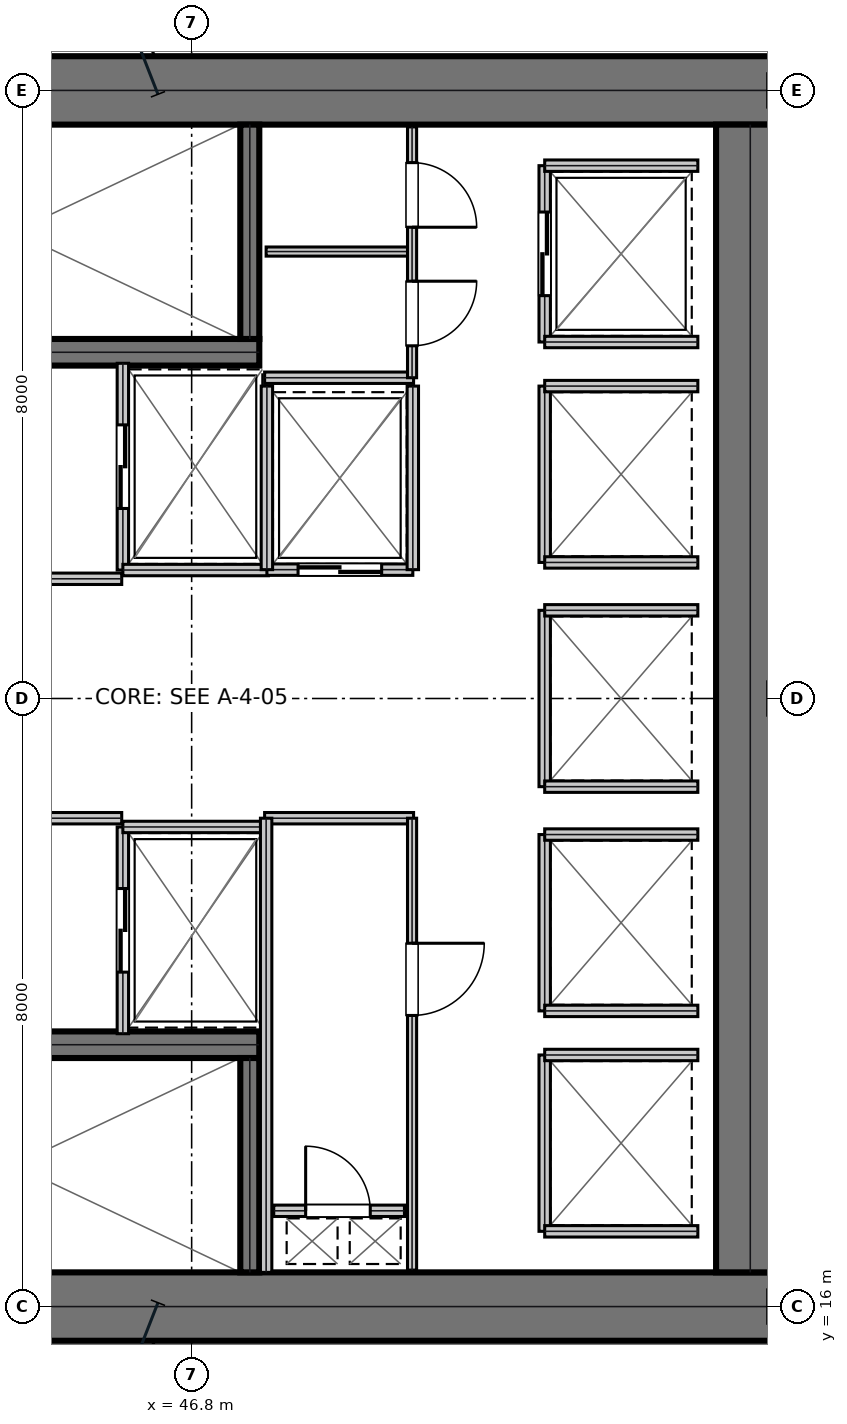
"""IFC4 building model, lengths in metres.
Left out: names, types, materials, properties, quantities, classifications, styles, units other than length and angle.
Written with IfcOpenShell. Run it as: python <this file> out.ifc"""

import sys

from ifc_helpers import new_model, si_unit, direction, frame, frame_2d, origin, place, context, subcontext, project, spatial, rectangle, extrude, element, fill, save


model = new_model("IFC4")
c1 = context("Model", 3, precision=1e-05, world=origin(), true_north=direction((0.0, 1.0)))
c2 = subcontext(c1, "Body", "Model", "MODEL_VIEW")
j1 = project(units=[si_unit("LENGTHUNIT", "METRE"), si_unit("PLANEANGLEUNIT", "RADIAN")], contexts=[c1])
p1 = place(None, origin())
s1 = spatial("IfcSite", under=j1, at=p1, CompositionType="ELEMENT")
p2 = place(p1, origin())
s2 = spatial("IfcBuilding", under=s1, at=p2, CompositionType="ELEMENT")
p3 = place(p2, frame((0.0, 0.0, 58.05)))
s3 = spatial("IfcBuildingStorey", under=s2, at=p3, CompositionType="ELEMENT", Elevation=58.05)
for number, where, z_axis, x_axis in (
    (1, (38.8, 32.0, 0.0), (0.0, 0.0, 1.0), (1.0, 0.0, 0.0)),
    (2, (38.8, 16.0, 0.0), (0.0, 0.0, 1.0), (1.0, 0.0, 0.0)),
):
    element("IfcWall", number, at=place(p3, frame(where, z_axis=z_axis, x_axis=x_axis)), inside=s3, PredefinedType="SHEAR", context=c2, shape_type="SweptSolid", body=[
        extrude(rectangle(XDim=16.0, YDim=0.9, at=frame_2d((8.0, 0.0))), origin(), (0.0, 0.0, 1.0), 3.81),
    ])
p4 = place(p3, frame((54.15, 16.45, 0.0), z_axis=(0.0, 0.0, 1.0), x_axis=(0.0, 1.0, 0.0)))
e3 = element("IfcWall", 3, at=p4, inside=s3, PredefinedType="SHEAR", context=c2, shape_type="SweptSolid", body=[
    extrude(rectangle(XDim=15.1, YDim=0.9, at=frame_2d((7.55, 0.0))), origin(), (0.0, 0.0, 1.0), 3.81),
])
p5 = place(p3, frame((39.98, 28.555, 0.0), z_axis=(0.0, 0.0, 1.0), x_axis=(1.0, 0.0, 0.0)))
e4 = element("IfcWall", 4, at=p5, inside=s3, PredefinedType="SHEAR", context=c2, shape_type="SweptSolid", body=[
    extrude(rectangle(XDim=7.71, YDim=0.35, at=frame_2d((3.855, 0.0))), origin(), (0.0, 0.0, 1.0), 3.81),
])
p6 = place(p5, frame((0.25, 0.0, 0.0)))
e5 = element("IfcOpeningElement", 5, at=p6, cuts=e4, PredefinedType="OPENING", context=c2, shape_type="SweptSolid", body=[
    extrude(rectangle(XDim=1.1, YDim=2.15, at=frame_2d((0.55, 1.075))), frame((0.0, 0.185, 0.0), z_axis=(0.0, -1.0, 0.0), x_axis=(1.0, 0.0, 0.0)), (0.0, 0.0, 1.0), 0.37),
])
p7 = place(p3, frame((39.98, 19.445, 0.0), z_axis=(0.0, 0.0, 1.0), x_axis=(1.0, 0.0, 0.0)))
e6 = element("IfcWall", 6, at=p7, inside=s3, PredefinedType="SHEAR", context=c2, shape_type="SweptSolid", body=[
    extrude(rectangle(XDim=7.71, YDim=0.35, at=frame_2d((3.855, 0.0))), origin(), (0.0, 0.0, 1.0), 3.81),
])
p8 = place(p7, frame((0.25, 0.0, 0.0)))
e7 = element("IfcOpeningElement", 7, at=p8, cuts=e6, PredefinedType="OPENING", context=c2, shape_type="SweptSolid", body=[
    extrude(rectangle(XDim=1.1, YDim=2.15, at=frame_2d((0.55, 1.075))), frame((0.0, 0.185, 0.0), z_axis=(0.0, -1.0, 0.0), x_axis=(1.0, 0.0, 0.0)), (0.0, 0.0, 1.0), 0.37),
])
for number, where, z_axis, x_axis in (
    (8, (47.565, 28.73, 0.0), (0.0, 0.0, 1.0), (0.0, 1.0, 0.0)),
    (9, (47.565, 16.45, 0.0), (0.0, 0.0, 1.0), (0.0, 1.0, 0.0)),
):
    element("IfcWall", number, at=place(p3, frame(where, z_axis=z_axis, x_axis=x_axis)), inside=s3, PredefinedType="SHEAR", context=c2, shape_type="SweptSolid", body=[
        extrude(rectangle(XDim=2.82, YDim=0.25, at=frame_2d((1.41, 0.0))), origin(), (0.0, 0.0, 1.0), 3.81),
    ])
p9 = place(p3, frame((39.98, 25.575, 0.0), z_axis=(0.0, 0.0, 1.0), x_axis=(1.0, 0.0, 0.0)))
e10 = element("IfcWall", 10, at=p9, inside=s3, PredefinedType="PARTITIONING", context=c2, shape_type="SweptSolid", body=[
    extrude(rectangle(XDim=5.9, YDim=0.15, at=frame_2d((2.95, 0.0))), origin(), (0.0, 0.0, 1.0), 3.81),
])
p10 = place(p9, frame((2.35, 0.0, 0.0)))
e11 = element("IfcOpeningElement", 11, at=p10, cuts=e10, PredefinedType="OPENING", context=c2, shape_type="SweptSolid", body=[
    extrude(rectangle(XDim=1.05, YDim=2.15, at=frame_2d((0.525, 1.075))), frame((0.0, 0.085, 0.0), z_axis=(0.0, -1.0, 0.0), x_axis=(1.0, 0.0, 0.0)), (0.0, 0.0, 1.0), 0.17),
])
p11 = place(p3, frame((39.98, 22.425, 0.0), z_axis=(0.0, 0.0, 1.0), x_axis=(1.0, 0.0, 0.0)))
e12 = element("IfcWall", 12, at=p11, inside=s3, PredefinedType="PARTITIONING", context=c2, shape_type="SweptSolid", body=[
    extrude(rectangle(XDim=5.9, YDim=0.15, at=frame_2d((2.95, 0.0))), origin(), (0.0, 0.0, 1.0), 3.81),
])
p12 = place(p11, frame((2.35, 0.0, 0.0)))
e13 = element("IfcOpeningElement", 13, at=p12, cuts=e12, PredefinedType="OPENING", context=c2, shape_type="SweptSolid", body=[
    extrude(rectangle(XDim=1.05, YDim=2.15, at=frame_2d((0.525, 1.075))), frame((0.0, 0.085, 0.0), z_axis=(0.0, -1.0, 0.0), x_axis=(1.0, 0.0, 0.0)), (0.0, 0.0, 1.0), 0.17),
])
p13 = place(p3, frame((45.895, 25.69, 0.0), z_axis=(0.0, 0.0, 1.0), x_axis=(0.0, 1.0, 0.0)))
e14 = element("IfcWall", 14, at=p13, inside=s3, PredefinedType="PARTITIONING", context=c2, shape_type="SweptSolid", body=[
    extrude(rectangle(XDim=2.72, YDim=0.15, at=frame_2d((1.36, 0.0))), origin(), (0.0, 0.0, 1.0), 3.81),
])
p14 = place(p13, frame((0.81, 0.0, 0.0)))
e15 = element("IfcOpeningElement", 15, at=p14, cuts=e14, PredefinedType="OPENING", context=c2, shape_type="SweptSolid", body=[
    extrude(rectangle(XDim=1.1, YDim=2.15, at=frame_2d((0.55, 1.075))), frame((0.0, 0.085, 0.0), z_axis=(0.0, -1.0, 0.0), x_axis=(1.0, 0.0, 0.0)), (0.0, 0.0, 1.0), 0.17),
])
p15 = place(p3, frame((45.895, 25.69, 0.0), z_axis=(0.0, 0.0, 1.0), x_axis=(1.0, 0.0, 0.0)))
e16 = element("IfcWall", 16, at=p15, inside=s3, PredefinedType="PARTITIONING", context=c2, shape_type="SweptSolid", body=[
    extrude(rectangle(XDim=1.915, YDim=0.15, at=frame_2d((0.958, 0.0))), origin(), (0.0, 0.0, 1.0), 3.81),
])
p16 = place(p3, frame((45.895, 19.59, 0.0), z_axis=(0.0, 0.0, 1.0), x_axis=(0.0, 1.0, 0.0)))
e17 = element("IfcWall", 17, at=p16, inside=s3, PredefinedType="PARTITIONING", context=c2, shape_type="SweptSolid", body=[
    extrude(rectangle(XDim=2.72, YDim=0.15, at=frame_2d((1.36, 0.0))), origin(), (0.0, 0.0, 1.0), 3.81),
])
p17 = place(p16, frame((0.81, 0.0, 0.0)))
e18 = element("IfcOpeningElement", 18, at=p17, cuts=e17, PredefinedType="OPENING", context=c2, shape_type="SweptSolid", body=[
    extrude(rectangle(XDim=1.1, YDim=2.15, at=frame_2d((0.55, 1.075))), frame((0.0, 0.085, 0.0), z_axis=(0.0, -1.0, 0.0), x_axis=(1.0, 0.0, 0.0)), (0.0, 0.0, 1.0), 0.17),
])
p18 = place(p3, frame((45.895, 22.31, 0.0), z_axis=(0.0, 0.0, 1.0), x_axis=(1.0, 0.0, 0.0)))
e19 = element("IfcWall", 19, at=p18, inside=s3, PredefinedType="PARTITIONING", context=c2, shape_type="SweptSolid", body=[
    extrude(rectangle(XDim=1.915, YDim=0.15, at=frame_2d((0.958, 0.0))), origin(), (0.0, 0.0, 1.0), 3.81),
])
p19 = place(p3, frame((47.79, 25.695, 0.0), z_axis=(0.0, 0.0, 1.0), x_axis=(1.0, 0.0, 0.0)))
e20 = element("IfcWall", 20, at=p19, inside=s3, PredefinedType="PARTITIONING", context=c2, shape_type="SweptSolid", body=[
    extrude(rectangle(XDim=1.92, YDim=0.15, at=frame_2d((0.96, 0.0))), origin(), (0.0, 0.0, 1.0), 3.81),
])
p20 = place(p19, frame((0.41, 0.0, 0.0)))
e21 = element("IfcOpeningElement", 21, at=p20, cuts=e20, PredefinedType="OPENING", context=c2, shape_type="SweptSolid", body=[
    extrude(rectangle(XDim=1.1, YDim=2.15, at=frame_2d((0.55, 1.075))), frame((0.0, 0.085, 0.0), z_axis=(0.0, -1.0, 0.0), x_axis=(1.0, 0.0, 0.0)), (0.0, 0.0, 1.0), 0.17),
])
for number, where, z_axis, x_axis in (
    (22, (47.79, 25.695, 0.0), (0.0, 0.0, 1.0), (0.0, 1.0, 0.0)),
    (23, (49.71, 25.695, 0.0), (0.0, 0.0, 1.0), (0.0, 1.0, 0.0)),
):
    element("IfcWall", number, at=place(p3, frame(where, z_axis=z_axis, x_axis=x_axis)), inside=s3, PredefinedType="PARTITIONING", context=c2, shape_type="SweptSolid", body=[
        extrude(rectangle(XDim=2.415, YDim=0.15, at=frame_2d((1.208, 0.0))), origin(), (0.0, 0.0, 1.0), 3.81),
    ])
p21 = place(p3, frame((51.445, 28.69, 0.0), z_axis=(0.0, 0.0, 1.0), x_axis=(0.0, 1.0, 0.0)))
e24 = element("IfcWall", 24, at=p21, inside=s3, PredefinedType="PARTITIONING", context=c2, shape_type="SweptSolid", body=[
    extrude(rectangle(XDim=2.32, YDim=0.15, at=frame_2d((1.16, 0.0))), origin(), (0.0, 0.0, 1.0), 3.81),
])
p22 = place(p21, frame((0.61, 0.0, 0.0)))
e25 = element("IfcOpeningElement", 25, at=p22, cuts=e24, PredefinedType="OPENING", context=c2, shape_type="SweptSolid", body=[
    extrude(rectangle(XDim=1.1, YDim=2.15, at=frame_2d((0.55, 1.075))), frame((0.0, 0.085, 0.0), z_axis=(0.0, -1.0, 0.0), x_axis=(1.0, 0.0, 0.0)), (0.0, 0.0, 1.0), 0.17),
])
for number, where, z_axis, x_axis in (
    (26, (51.445, 28.69, 0.0), (0.0, 0.0, 1.0), (1.0, 0.0, 0.0)),
    (27, (51.445, 31.01, 0.0), (0.0, 0.0, 1.0), (1.0, 0.0, 0.0)),
):
    element("IfcWall", number, at=place(p3, frame(where, z_axis=z_axis, x_axis=x_axis)), inside=s3, PredefinedType="PARTITIONING", context=c2, shape_type="SweptSolid", body=[
        extrude(rectangle(XDim=2.015, YDim=0.15, at=frame_2d((1.007, 0.0))), origin(), (0.0, 0.0, 1.0), 3.81),
    ])
p23 = place(p3, frame((51.445, 25.79, 0.0), z_axis=(0.0, 0.0, 1.0), x_axis=(0.0, 1.0, 0.0)))
e28 = element("IfcWall", 28, at=p23, inside=s3, PredefinedType="PARTITIONING", context=c2, shape_type="SweptSolid", body=[
    extrude(rectangle(XDim=2.32, YDim=0.15, at=frame_2d((1.16, 0.0))), origin(), (0.0, 0.0, 1.0), 3.81),
])
for number, where, z_axis, x_axis in (
    (29, (51.445, 25.79, 0.0), (0.0, 0.0, 1.0), (1.0, 0.0, 0.0)),
    (30, (51.445, 28.11, 0.0), (0.0, 0.0, 1.0), (1.0, 0.0, 0.0)),
):
    element("IfcWall", number, at=place(p3, frame(where, z_axis=z_axis, x_axis=x_axis)), inside=s3, PredefinedType="PARTITIONING", context=c2, shape_type="SweptSolid", body=[
        extrude(rectangle(XDim=2.015, YDim=0.15, at=frame_2d((1.007, 0.0))), origin(), (0.0, 0.0, 1.0), 3.81),
    ])
p24 = place(p3, frame((51.445, 19.89, 0.0), z_axis=(0.0, 0.0, 1.0), x_axis=(0.0, 1.0, 0.0)))
e31 = element("IfcWall", 31, at=p24, inside=s3, PredefinedType="PARTITIONING", context=c2, shape_type="SweptSolid", body=[
    extrude(rectangle(XDim=2.32, YDim=0.15, at=frame_2d((1.16, 0.0))), origin(), (0.0, 0.0, 1.0), 3.81),
])
for number, where, z_axis, x_axis in (
    (32, (51.445, 19.89, 0.0), (0.0, 0.0, 1.0), (1.0, 0.0, 0.0)),
    (33, (51.445, 22.21, 0.0), (0.0, 0.0, 1.0), (1.0, 0.0, 0.0)),
):
    element("IfcWall", number, at=place(p3, frame(where, z_axis=z_axis, x_axis=x_axis)), inside=s3, PredefinedType="PARTITIONING", context=c2, shape_type="SweptSolid", body=[
        extrude(rectangle(XDim=2.015, YDim=0.15, at=frame_2d((1.007, 0.0))), origin(), (0.0, 0.0, 1.0), 3.81),
    ])
p25 = place(p3, frame((51.445, 22.84, 0.0), z_axis=(0.0, 0.0, 1.0), x_axis=(0.0, 1.0, 0.0)))
e34 = element("IfcWall", 34, at=p25, inside=s3, PredefinedType="PARTITIONING", context=c2, shape_type="SweptSolid", body=[
    extrude(rectangle(XDim=2.32, YDim=0.15, at=frame_2d((1.16, 0.0))), origin(), (0.0, 0.0, 1.0), 3.81),
])
for number, where, z_axis, x_axis in (
    (35, (51.445, 22.84, 0.0), (0.0, 0.0, 1.0), (1.0, 0.0, 0.0)),
    (36, (51.445, 25.16, 0.0), (0.0, 0.0, 1.0), (1.0, 0.0, 0.0)),
):
    element("IfcWall", number, at=place(p3, frame(where, z_axis=z_axis, x_axis=x_axis)), inside=s3, PredefinedType="PARTITIONING", context=c2, shape_type="SweptSolid", body=[
        extrude(rectangle(XDim=2.015, YDim=0.15, at=frame_2d((1.007, 0.0))), origin(), (0.0, 0.0, 1.0), 3.81),
    ])
p26 = place(p3, frame((51.445, 16.99, 0.0), z_axis=(0.0, 0.0, 1.0), x_axis=(0.0, 1.0, 0.0)))
e37 = element("IfcWall", 37, at=p26, inside=s3, PredefinedType="PARTITIONING", context=c2, shape_type="SweptSolid", body=[
    extrude(rectangle(XDim=2.32, YDim=0.15, at=frame_2d((1.16, 0.0))), origin(), (0.0, 0.0, 1.0), 3.81),
])
for number, where, z_axis, x_axis in (
    (38, (51.445, 16.99, 0.0), (0.0, 0.0, 1.0), (1.0, 0.0, 0.0)),
    (39, (51.445, 19.31, 0.0), (0.0, 0.0, 1.0), (1.0, 0.0, 0.0)),
):
    element("IfcWall", number, at=place(p3, frame(where, z_axis=z_axis, x_axis=x_axis)), inside=s3, PredefinedType="PARTITIONING", context=c2, shape_type="SweptSolid", body=[
        extrude(rectangle(XDim=2.015, YDim=0.15, at=frame_2d((1.007, 0.0))), origin(), (0.0, 0.0, 1.0), 3.81),
    ])
p27 = place(p3, frame((47.88, 17.26, 0.0), z_axis=(0.0, 0.0, 1.0), x_axis=(1.0, 0.0, 0.0)))
e40 = element("IfcWall", 40, at=p27, inside=s3, PredefinedType="PARTITIONING", context=c2, shape_type="SweptSolid", body=[
    extrude(rectangle(XDim=1.72, YDim=0.15, at=frame_2d((0.86, 0.0))), origin(), (0.0, 0.0, 1.0), 3.81),
])
p28 = place(p27, frame((0.42, 0.0, 0.0)))
e41 = element("IfcOpeningElement", 41, at=p28, cuts=e40, PredefinedType="OPENING", context=c2, shape_type="SweptSolid", body=[
    extrude(rectangle(XDim=0.85, YDim=2.15, at=frame_2d((0.425, 1.075))), frame((0.0, 0.085, 0.0), z_axis=(0.0, -1.0, 0.0), x_axis=(1.0, 0.0, 0.0)), (0.0, 0.0, 1.0), 0.17),
])
p29 = place(p3, frame((47.76, 22.425, 0.0), z_axis=(0.0, 0.0, 1.0), x_axis=(1.0, 0.0, 0.0)))
e42 = element("IfcWall", 42, at=p29, inside=s3, PredefinedType="PARTITIONING", context=c2, shape_type="SweptSolid", body=[
    extrude(rectangle(XDim=1.96, YDim=0.15, at=frame_2d((0.98, 0.0))), origin(), (0.0, 0.0, 1.0), 3.81),
])
p30 = place(p3, frame((47.78, 16.45, 0.0), z_axis=(0.0, 0.0, 1.0), x_axis=(0.0, 1.0, 0.0)))
e43 = element("IfcWall", 43, at=p30, inside=s3, PredefinedType="PARTITIONING", context=c2, shape_type="SweptSolid", body=[
    extrude(rectangle(XDim=5.975, YDim=0.15, at=frame_2d((2.988, 0.0))), origin(), (0.0, 0.0, 1.0), 3.81),
])
p31 = place(p3, frame((49.7, 16.48, 0.0), z_axis=(0.0, 0.0, 1.0), x_axis=(0.0, 1.0, 0.0)))
e44 = element("IfcWall", 44, at=p31, inside=s3, PredefinedType="PARTITIONING", context=c2, shape_type="SweptSolid", body=[
    extrude(rectangle(XDim=5.945, YDim=0.12, at=frame_2d((2.973, 0.0))), origin(), (0.0, 0.0, 1.0), 3.81),
])
p32 = place(p31, frame((3.35, 0.0, 0.0)))
e45 = element("IfcOpeningElement", 45, at=p32, cuts=e44, PredefinedType="OPENING", context=c2, shape_type="SweptSolid", body=[
    extrude(rectangle(XDim=0.95, YDim=2.15, at=frame_2d((0.475, 1.075))), frame((0.0, 0.07, 0.0), z_axis=(0.0, -1.0, 0.0), x_axis=(1.0, 0.0, 0.0)), (0.0, 0.0, 1.0), 0.14),
])
p33 = place(p3, frame((47.76, 28.22, 0.0), z_axis=(0.0, 0.0, 1.0), x_axis=(1.0, 0.0, 0.0)))
e46 = element("IfcWall", 46, at=p33, inside=s3, PredefinedType="PARTITIONING", context=c2, shape_type="SweptSolid", body=[
    extrude(rectangle(XDim=1.96, YDim=0.15, at=frame_2d((0.98, 0.0))), origin(), (0.0, 0.0, 1.0), 3.81),
])
p34 = place(p3, frame((47.78, 29.88, 0.0), z_axis=(0.0, 0.0, 1.0), x_axis=(1.0, 0.0, 0.0)))
e47 = element("IfcWall", 47, at=p34, inside=s3, PredefinedType="PARTITIONING", context=c2, shape_type="SweptSolid", body=[
    extrude(rectangle(XDim=1.92, YDim=0.12, at=frame_2d((0.96, 0.0))), origin(), (0.0, 0.0, 1.0), 3.81),
])
p35 = place(p3, frame((49.7, 28.22, 0.0), z_axis=(0.0, 0.0, 1.0), x_axis=(0.0, 1.0, 0.0)))
e48 = element("IfcWall", 48, at=p35, inside=s3, PredefinedType="PARTITIONING", context=c2, shape_type="SweptSolid", body=[
    extrude(rectangle(XDim=3.3, YDim=0.12, at=frame_2d((1.65, 0.0))), origin(), (0.0, 0.0, 1.0), 3.81),
])
p36 = place(p35, frame((0.42, 0.0, 0.0)))
e49 = element("IfcOpeningElement", 49, at=p36, cuts=e48, PredefinedType="OPENING", context=c2, shape_type="SweptSolid", body=[
    extrude(rectangle(XDim=0.85, YDim=2.15, at=frame_2d((0.425, 1.075))), frame((0.0, 0.07, 0.0), z_axis=(0.0, -1.0, 0.0), x_axis=(1.0, 0.0, 0.0)), (0.0, 0.0, 1.0), 0.14),
])
p37 = place(p35, frame((1.98, 0.0, 0.0)))
e50 = element("IfcOpeningElement", 50, at=p37, cuts=e48, PredefinedType="OPENING", context=c2, shape_type="SweptSolid", body=[
    extrude(rectangle(XDim=0.85, YDim=2.15, at=frame_2d((0.425, 1.075))), frame((0.0, 0.07, 0.0), z_axis=(0.0, -1.0, 0.0), x_axis=(1.0, 0.0, 0.0)), (0.0, 0.0, 1.0), 0.14),
])
p38 = place(p14, frame((1.1, 0.0, 0.0), z_axis=(0.0, 0.0, 1.0), x_axis=(-1.0, 0.0, 0.0)))
e51 = element("IfcDoor", 51, at=p38, inside=s3, OperationType="DOUBLE_DOOR_SLIDING", PredefinedType="DOOR", context=c2, shape_type="SweptSolid", body=[
    extrude(rectangle(XDim=1.1, YDim=2.15, at=frame_2d((0.55, 1.075))), frame((0.0, 0.025, 0.0), z_axis=(0.0, -1.0, 0.0), x_axis=(1.0, 0.0, 0.0)), (0.0, 0.0, 1.0), 0.05),
])
fill(e15, e51)
p39 = place(p17, frame((1.1, 0.0, 0.0), z_axis=(0.0, 0.0, 1.0), x_axis=(-1.0, 0.0, 0.0)))
e52 = element("IfcDoor", 52, at=p39, inside=s3, OperationType="DOUBLE_DOOR_SLIDING", PredefinedType="DOOR", context=c2, shape_type="SweptSolid", body=[
    extrude(rectangle(XDim=1.1, YDim=2.15, at=frame_2d((0.55, 1.075))), frame((0.0, 0.025, 0.0), z_axis=(0.0, -1.0, 0.0), x_axis=(1.0, 0.0, 0.0)), (0.0, 0.0, 1.0), 0.05),
])
fill(e18, e52)
p40 = place(p20, frame((1.1, 0.0, 0.0), z_axis=(0.0, 0.0, 1.0), x_axis=(-1.0, 0.0, 0.0)))
e53 = element("IfcDoor", 53, at=p40, inside=s3, OperationType="DOUBLE_DOOR_SLIDING", PredefinedType="DOOR", context=c2, shape_type="SweptSolid", body=[
    extrude(rectangle(XDim=1.1, YDim=2.15, at=frame_2d((0.55, 1.075))), frame((0.0, 0.025, 0.0), z_axis=(0.0, -1.0, 0.0), x_axis=(1.0, 0.0, 0.0)), (0.0, 0.0, 1.0), 0.05),
])
fill(e21, e53)
p41 = place(p22, frame((1.1, 0.0, 0.0), z_axis=(0.0, 0.0, 1.0), x_axis=(-1.0, 0.0, 0.0)))
e54 = element("IfcDoor", 54, at=p41, inside=s3, OperationType="DOUBLE_DOOR_SLIDING", PredefinedType="DOOR", context=c2, shape_type="SweptSolid", body=[
    extrude(rectangle(XDim=1.1, YDim=2.15, at=frame_2d((0.55, 1.075))), frame((0.0, 0.025, 0.0), z_axis=(0.0, -1.0, 0.0), x_axis=(1.0, 0.0, 0.0)), (0.0, 0.0, 1.0), 0.05),
])
fill(e25, e54)
p42 = place(p28, origin())
e55 = element("IfcDoor", 55, at=p42, inside=s3, OperationType="SINGLE_SWING_LEFT", PredefinedType="TRAPDOOR", context=c2, shape_type="SweptSolid", body=[
    extrude(rectangle(XDim=0.85, YDim=2.15, at=frame_2d((0.425, 1.075))), frame((0.0, 0.025, 0.0), z_axis=(0.0, -1.0, 0.0), x_axis=(1.0, 0.0, 0.0)), (0.0, 0.0, 1.0), 0.05),
])
fill(e41, e55)
p43 = place(p32, frame((0.95, 0.0, 0.0), z_axis=(0.0, 0.0, 1.0), x_axis=(-1.0, 0.0, 0.0)))
e56 = element("IfcDoor", 56, at=p43, inside=s3, OperationType="SINGLE_SWING_LEFT", PredefinedType="DOOR", context=c2, shape_type="SweptSolid", body=[
    extrude(rectangle(XDim=0.95, YDim=2.15, at=frame_2d((0.475, 1.075))), frame((0.0, 0.025, 0.0), z_axis=(0.0, -1.0, 0.0), x_axis=(1.0, 0.0, 0.0)), (0.0, 0.0, 1.0), 0.05),
])
fill(e45, e56)
p44 = place(p36, frame((0.85, 0.0, 0.0), z_axis=(0.0, 0.0, 1.0), x_axis=(-1.0, 0.0, 0.0)))
e57 = element("IfcDoor", 57, at=p44, inside=s3, OperationType="SINGLE_SWING_LEFT", PredefinedType="DOOR", context=c2, shape_type="SweptSolid", body=[
    extrude(rectangle(XDim=0.85, YDim=2.15, at=frame_2d((0.425, 1.075))), frame((0.0, 0.025, 0.0), z_axis=(0.0, -1.0, 0.0), x_axis=(1.0, 0.0, 0.0)), (0.0, 0.0, 1.0), 0.05),
])
fill(e49, e57)
p45 = place(p37, frame((0.85, 0.0, 0.0), z_axis=(0.0, 0.0, 1.0), x_axis=(-1.0, 0.0, 0.0)))
e58 = element("IfcDoor", 58, at=p45, inside=s3, OperationType="SINGLE_SWING_RIGHT", PredefinedType="DOOR", context=c2, shape_type="SweptSolid", body=[
    extrude(rectangle(XDim=0.85, YDim=2.15, at=frame_2d((0.425, 1.075))), frame((0.0, 0.025, 0.0), z_axis=(0.0, -1.0, 0.0), x_axis=(1.0, 0.0, 0.0)), (0.0, 0.0, 1.0), 0.05),
])
fill(e50, e58)
save(model, sys.argv[1])
